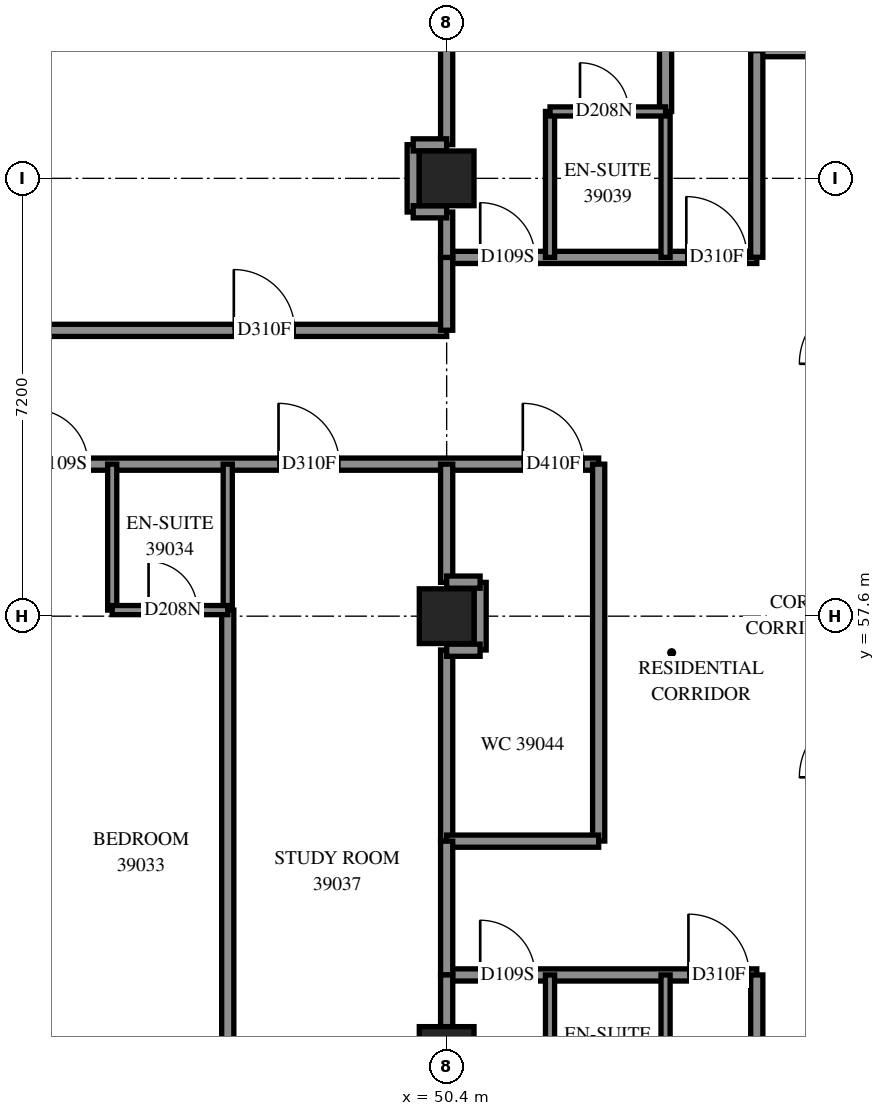
"""IFC4 building model, lengths in metres.
Left out: names, types, materials, properties, quantities, classifications, styles, units other than length and angle.
Written with IfcOpenShell. Run it as: python <this file> out.ifc"""

import sys

from ifc_helpers import new_model, si_unit, direction, frame, frame_2d, origin, origin_2d, place, context, subcontext, project, spatial, rectangle, extrude, element, fill, save


model = new_model("IFC4")
c1 = context("Model", 3, precision=1e-05, world=origin(), true_north=direction((0.0, 1.0)))
c2 = subcontext(c1, "Body", "Model", "MODEL_VIEW")
j1 = project(units=[si_unit("LENGTHUNIT", "METRE"), si_unit("PLANEANGLEUNIT", "RADIAN")], contexts=[c1])
p1 = place(None, origin())
s1 = spatial("IfcSite", under=j1, at=p1, CompositionType="ELEMENT")
p2 = place(p1, origin())
s2 = spatial("IfcBuilding", under=s1, at=p2, CompositionType="ELEMENT")
p3 = place(p2, frame((0.0, 0.0, 145.6)))
s3 = spatial("IfcBuildingStorey", under=s2, at=p3, CompositionType="ELEMENT", Elevation=145.6)
for number, where, z_axis, x_axis in (
    (1, (50.4, 50.4, 0.0), (0.0, 0.0, 1.0), (1.0, 0.0, 0.0)),
    (2, (50.4, 57.6, 0.0), (0.0, 0.0, 1.0), (1.0, 0.0, 0.0)),
    (3, (50.4, 64.8, 0.0), (0.0, 0.0, 1.0), (1.0, 0.0, 0.0)),
):
    element("IfcColumn", number, at=place(p3, frame(where, z_axis=z_axis, x_axis=x_axis)), inside=s3, PredefinedType="COLUMN", context=c2, shape_type="SweptSolid", body=[
        extrude(rectangle(XDim=0.9, YDim=0.9, at=origin_2d()), origin(), (0.0, 0.0, 1.0), 3.1),
    ])
p4 = place(p3, frame((55.5, 66.9, 0.0), z_axis=(0.0, 0.0, 1.0), x_axis=(1.0, 0.0, 0.0)))
e4 = element("IfcWall", 4, at=p4, inside=s3, PredefinedType="PARTITIONING", context=c2, shape_type="SweptSolid", body=[
    extrude(rectangle(XDim=18.6, YDim=0.2, at=frame_2d((9.3, 0.0))), origin(), (0.0, 0.0, 1.0), 3.1),
])
p5 = place(p4, frame((4.4, 0.0, 0.0)))
e5 = element("IfcOpeningElement", 5, at=p5, cuts=e4, PredefinedType="OPENING", context=c2, shape_type="SweptSolid", body=[
    extrude(rectangle(XDim=0.9, YDim=2.1, at=frame_2d((0.45, 1.05))), frame((0.0, 0.11, 0.0), z_axis=(0.0, -1.0, 0.0), x_axis=(1.0, 0.0, 0.0)), (0.0, 0.0, 1.0), 0.22),
])
p6 = place(p4, frame((6.1, 0.0, 0.0)))
e6 = element("IfcOpeningElement", 6, at=p6, cuts=e4, PredefinedType="OPENING", context=c2, shape_type="SweptSolid", body=[
    extrude(rectangle(XDim=0.9, YDim=2.1, at=frame_2d((0.45, 1.05))), frame((0.0, 0.11, 0.0), z_axis=(0.0, -1.0, 0.0), x_axis=(1.0, 0.0, 0.0)), (0.0, 0.0, 1.0), 0.22),
])
p7 = place(p4, frame((11.65, 0.0, 0.0)))
e7 = element("IfcOpeningElement", 7, at=p7, cuts=e4, PredefinedType="OPENING", context=c2, shape_type="SweptSolid", body=[
    extrude(rectangle(XDim=0.9, YDim=2.1, at=frame_2d((0.45, 1.05))), frame((0.0, 0.11, 0.0), z_axis=(0.0, -1.0, 0.0), x_axis=(1.0, 0.0, 0.0)), (0.0, 0.0, 1.0), 0.22),
])
p8 = place(p4, frame((13.3, 0.0, 0.0)))
e8 = element("IfcOpeningElement", 8, at=p8, cuts=e4, PredefinedType="OPENING", context=c2, shape_type="SweptSolid", body=[
    extrude(rectangle(XDim=0.9, YDim=2.1, at=frame_2d((0.45, 1.05))), frame((0.0, 0.11, 0.0), z_axis=(0.0, -1.0, 0.0), x_axis=(1.0, 0.0, 0.0)), (0.0, 0.0, 1.0), 0.22),
])
p9 = place(p3, frame((36.0, 60.1, 0.0), z_axis=(0.0, 0.0, 1.0), x_axis=(1.0, 0.0, 0.0)))
e9 = element("IfcWall", 9, at=p9, inside=s3, PredefinedType="PARTITIONING", context=c2, shape_type="SweptSolid", body=[
    extrude(rectangle(XDim=16.9, YDim=0.2, at=frame_2d((8.45, 0.0))), origin(), (0.0, 0.0, 1.0), 3.1),
])
p10 = place(p9, frame((4.125, 0.0, 0.0)))
e10 = element("IfcOpeningElement", 10, at=p10, cuts=e9, PredefinedType="OPENING", context=c2, shape_type="SweptSolid", body=[
    extrude(rectangle(XDim=1.0, YDim=2.1, at=frame_2d((0.5, 1.05))), frame((0.0, 0.11, 0.0), z_axis=(0.0, -1.0, 0.0), x_axis=(1.0, 0.0, 0.0)), (0.0, 0.0, 1.0), 0.22),
])
p11 = place(p9, frame((7.6, 0.0, 0.0)))
e11 = element("IfcOpeningElement", 11, at=p11, cuts=e9, PredefinedType="OPENING", context=c2, shape_type="SweptSolid", body=[
    extrude(rectangle(XDim=0.9, YDim=2.1, at=frame_2d((0.45, 1.05))), frame((0.0, 0.11, 0.0), z_axis=(0.0, -1.0, 0.0), x_axis=(1.0, 0.0, 0.0)), (0.0, 0.0, 1.0), 0.22),
])
p12 = place(p9, frame((11.635, 0.0, 0.0)))
e12 = element("IfcOpeningElement", 12, at=p12, cuts=e9, PredefinedType="OPENING", context=c2, shape_type="SweptSolid", body=[
    extrude(rectangle(XDim=1.0, YDim=2.1, at=frame_2d((0.5, 1.05))), frame((0.0, 0.11, 0.0), z_axis=(0.0, -1.0, 0.0), x_axis=(1.0, 0.0, 0.0)), (0.0, 0.0, 1.0), 0.22),
])
p13 = place(p9, frame((15.652, 0.0, 0.0)))
e13 = element("IfcOpeningElement", 13, at=p13, cuts=e9, PredefinedType="OPENING", context=c2, shape_type="SweptSolid", body=[
    extrude(rectangle(XDim=1.0, YDim=2.1, at=frame_2d((0.5, 1.05))), frame((0.0, 0.11, 0.0), z_axis=(0.0, -1.0, 0.0), x_axis=(1.0, 0.0, 0.0)), (0.0, 0.0, 1.0), 0.22),
])
p14 = place(p3, frame((40.702, 62.3, 0.0), z_axis=(0.0, 0.0, 1.0), x_axis=(1.0, 0.0, 0.0)))
e14 = element("IfcWall", 14, at=p14, inside=s3, PredefinedType="PARTITIONING", context=c2, shape_type="SweptSolid", body=[
    extrude(rectangle(XDim=9.698, YDim=0.2, at=frame_2d((4.849, 0.0))), origin(), (0.0, 0.0, 1.0), 3.1),
])
p15 = place(p14, frame((6.198, 0.0, 0.0)))
e15 = element("IfcOpeningElement", 15, at=p15, cuts=e14, PredefinedType="OPENING", context=c2, shape_type="SweptSolid", body=[
    extrude(rectangle(XDim=1.0, YDim=2.1, at=frame_2d((0.5, 1.05))), frame((0.0, 0.11, 0.0), z_axis=(0.0, -1.0, 0.0), x_axis=(1.0, 0.0, 0.0)), (0.0, 0.0, 1.0), 0.22),
])
p16 = place(p3, frame((46.8, 49.7, 0.0), z_axis=(0.0, 0.0, 1.0), x_axis=(0.0, 1.0, 0.0)))
e16 = element("IfcWall", 16, at=p16, inside=s3, PredefinedType="PARTITIONING", context=c2, shape_type="SweptSolid", body=[
    extrude(rectangle(XDim=8.0, YDim=0.2, at=frame_2d((4.0, 0.0))), origin(), (0.0, 0.0, 1.0), 3.1),
])
p17 = place(p3, frame((54.0, 65.9, 0.0), z_axis=(0.0, 0.0, 1.0), x_axis=(0.0, 1.0, 0.0)))
e17 = element("IfcWall", 17, at=p17, inside=s3, PredefinedType="PARTITIONING", context=c2, shape_type="SweptSolid", body=[
    extrude(rectangle(XDim=6.843, YDim=0.2, at=frame_2d((3.422, 0.0))), origin(), (0.0, 0.0, 1.0), 3.1),
])
p18 = place(p3, frame((52.9, 53.902, 0.0), z_axis=(0.0, 0.0, 1.0), x_axis=(0.0, 1.0, 0.0)))
e18 = element("IfcWall", 18, at=p18, inside=s3, PredefinedType="PARTITIONING", context=c2, shape_type="SweptSolid", body=[
    extrude(rectangle(XDim=6.198, YDim=0.2, at=frame_2d((3.099, 0.0))), origin(), (0.0, 0.0, 1.0), 3.1),
])
p19 = place(p3, frame((50.4, 65.354, 0.0), z_axis=(0.0, 0.0, 1.0), x_axis=(0.0, 1.0, 0.0)))
e19 = element("IfcWall", 19, at=p19, inside=s3, PredefinedType="PARTITIONING", context=c2, shape_type="SweptSolid", body=[
    extrude(rectangle(XDim=6.092, YDim=0.2, at=frame_2d((3.046, 0.0))), origin(), (0.0, 0.0, 1.0), 3.1),
])
p20 = place(p3, frame((50.4, 51.7, 0.0), z_axis=(0.0, 0.0, 1.0), x_axis=(1.0, 0.0, 0.0)))
e20 = element("IfcWall", 20, at=p20, inside=s3, PredefinedType="PARTITIONING", context=c2, shape_type="SweptSolid", body=[
    extrude(rectangle(XDim=5.1, YDim=0.2, at=frame_2d((2.55, 0.0))), origin(), (0.0, 0.0, 1.0), 3.1),
])
p21 = place(p20, frame((0.552, 0.0, 0.0)))
e21 = element("IfcOpeningElement", 21, at=p21, cuts=e20, PredefinedType="OPENING", context=c2, shape_type="SweptSolid", body=[
    extrude(rectangle(XDim=0.9, YDim=2.1, at=frame_2d((0.45, 1.05))), frame((0.0, 0.11, 0.0), z_axis=(0.0, -1.0, 0.0), x_axis=(1.0, 0.0, 0.0)), (0.0, 0.0, 1.0), 0.22),
])
p22 = place(p20, frame((3.976, 0.0, 0.0)))
e22 = element("IfcOpeningElement", 22, at=p22, cuts=e20, PredefinedType="OPENING", context=c2, shape_type="SweptSolid", body=[
    extrude(rectangle(XDim=1.0, YDim=2.1, at=frame_2d((0.5, 1.05))), frame((0.0, 0.11, 0.0), z_axis=(0.0, -1.0, 0.0), x_axis=(1.0, 0.0, 0.0)), (0.0, 0.0, 1.0), 0.22),
])
p23 = place(p3, frame((50.4, 63.5, 0.0), z_axis=(0.0, 0.0, 1.0), x_axis=(1.0, 0.0, 0.0)))
e23 = element("IfcWall", 23, at=p23, inside=s3, PredefinedType="PARTITIONING", context=c2, shape_type="SweptSolid", body=[
    extrude(rectangle(XDim=5.1, YDim=0.2, at=frame_2d((2.55, 0.0))), origin(), (0.0, 0.0, 1.0), 3.1),
])
p24 = place(p23, frame((0.552, 0.0, 0.0)))
e24 = element("IfcOpeningElement", 24, at=p24, cuts=e23, PredefinedType="OPENING", context=c2, shape_type="SweptSolid", body=[
    extrude(rectangle(XDim=0.9, YDim=2.1, at=frame_2d((0.45, 1.05))), frame((0.0, 0.11, 0.0), z_axis=(0.0, -1.0, 0.0), x_axis=(1.0, 0.0, 0.0)), (0.0, 0.0, 1.0), 0.22),
])
p25 = place(p23, frame((3.941, 0.0, 0.0)))
e25 = element("IfcOpeningElement", 25, at=p25, cuts=e23, PredefinedType="OPENING", context=c2, shape_type="SweptSolid", body=[
    extrude(rectangle(XDim=1.0, YDim=2.1, at=frame_2d((0.5, 1.05))), frame((0.0, 0.11, 0.0), z_axis=(0.0, -1.0, 0.0), x_axis=(1.0, 0.0, 0.0)), (0.0, 0.0, 1.0), 0.22),
])
p26 = place(p3, frame((55.5, 48.3, 0.0), z_axis=(0.0, 0.0, 1.0), x_axis=(0.0, 1.0, 0.0)))
e26 = element("IfcWall", 26, at=p26, inside=s3, PredefinedType="PARTITIONING", context=c2, shape_type="SweptSolid", body=[
    extrude(rectangle(XDim=3.4, YDim=0.2, at=frame_2d((1.7, 0.0))), origin(), (0.0, 0.0, 1.0), 3.1),
])
p27 = place(p3, frame((55.5, 63.502, 0.0), z_axis=(0.0, 0.0, 1.0), x_axis=(0.0, 1.0, 0.0)))
e27 = element("IfcWall", 27, at=p27, inside=s3, PredefinedType="PARTITIONING", context=c2, shape_type="SweptSolid", body=[
    extrude(rectangle(XDim=3.398, YDim=0.2, at=frame_2d((1.699, 0.0))), origin(), (0.0, 0.0, 1.0), 3.1),
])
p28 = place(p3, frame((50.4, 53.9, 0.0), z_axis=(0.0, 0.0, 1.0), x_axis=(0.0, 1.0, 0.0)))
e28 = element("IfcWall", 28, at=p28, inside=s3, PredefinedType="PARTITIONING", context=c2, shape_type="SweptSolid", body=[
    extrude(rectangle(XDim=3.144, YDim=0.2, at=frame_2d((1.572, 0.0))), origin(), (0.0, 0.0, 1.0), 3.1),
])
p29 = place(p3, frame((50.4, 53.9, 0.0), z_axis=(0.0, 0.0, 1.0), x_axis=(1.0, 0.0, 0.0)))
e29 = element("IfcWall", 29, at=p29, inside=s3, PredefinedType="PARTITIONING", context=c2, shape_type="SweptSolid", body=[
    extrude(rectangle(XDim=2.5, YDim=0.2, at=frame_2d((1.25, 0.0))), origin(), (0.0, 0.0, 1.0), 3.1),
])
for number, where, z_axis, x_axis in (
    (30, (52.1, 49.3, 0.0), (0.0, 0.0, 1.0), (0.0, 1.0, 0.0)),
    (31, (52.1, 63.5, 0.0), (0.0, 0.0, 1.0), (0.0, 1.0, 0.0)),
    (32, (54.0, 49.3, 0.0), (0.0, 0.0, 1.0), (0.0, 1.0, 0.0)),
    (33, (54.0, 63.5, 0.0), (0.0, 0.0, 1.0), (0.0, 1.0, 0.0)),
    (34, (44.9, 57.7, 0.0), (0.0, 0.0, 1.0), (0.0, 1.0, 0.0)),
    (35, (46.8, 57.7, 0.0), (0.0, 0.0, 1.0), (0.0, 1.0, 0.0)),
):
    element("IfcWall", number, at=place(p3, frame(where, z_axis=z_axis, x_axis=x_axis)), inside=s3, PredefinedType="PARTITIONING", context=c2, shape_type="SweptSolid", body=[
        extrude(rectangle(XDim=2.4, YDim=0.15, at=frame_2d((1.2, 0.0))), origin(), (0.0, 0.0, 1.0), 3.1),
    ])
p30 = place(p3, frame((50.4, 51.7, 0.0), z_axis=(0.0, 0.0, 1.0), x_axis=(0.0, 1.0, 0.0)))
e36 = element("IfcWall", 36, at=p30, inside=s3, PredefinedType="PARTITIONING", context=c2, shape_type="SweptSolid", body=[
    extrude(rectangle(XDim=2.2, YDim=0.2, at=frame_2d((1.1, 0.0))), origin(), (0.0, 0.0, 1.0), 3.1),
])
p31 = place(p3, frame((50.4, 58.156, 0.0), z_axis=(0.0, 0.0, 1.0), x_axis=(0.0, 1.0, 0.0)))
e37 = element("IfcWall", 37, at=p31, inside=s3, PredefinedType="PARTITIONING", context=c2, shape_type="SweptSolid", body=[
    extrude(rectangle(XDim=1.944, YDim=0.2, at=frame_2d((0.972, 0.0))), origin(), (0.0, 0.0, 1.0), 3.1),
])
p32 = place(p3, frame((44.9, 57.7, 0.0), z_axis=(0.0, 0.0, 1.0), x_axis=(1.0, 0.0, 0.0)))
e38 = element("IfcWall", 38, at=p32, inside=s3, PredefinedType="PARTITIONING", context=c2, shape_type="SweptSolid", body=[
    extrude(rectangle(XDim=1.9, YDim=0.15, at=frame_2d((0.95, 0.0))), origin(), (0.0, 0.0, 1.0), 3.1),
])
p33 = place(p32, frame((0.598, 0.0, 0.0)))
e39 = element("IfcOpeningElement", 39, at=p33, cuts=e38, PredefinedType="OPENING", context=c2, shape_type="SweptSolid", body=[
    extrude(rectangle(XDim=0.8, YDim=2.1, at=frame_2d((0.4, 1.05))), frame((0.0, 0.085, 0.0), z_axis=(0.0, -1.0, 0.0), x_axis=(1.0, 0.0, 0.0)), (0.0, 0.0, 1.0), 0.17),
])
p34 = place(p3, frame((52.1, 65.9, 0.0), z_axis=(0.0, 0.0, 1.0), x_axis=(1.0, 0.0, 0.0)))
e40 = element("IfcWall", 40, at=p34, inside=s3, PredefinedType="PARTITIONING", context=c2, shape_type="SweptSolid", body=[
    extrude(rectangle(XDim=1.9, YDim=0.15, at=frame_2d((0.95, 0.0))), origin(), (0.0, 0.0, 1.0), 3.1),
])
p35 = place(p34, frame((0.493, 0.0, 0.0)))
e41 = element("IfcOpeningElement", 41, at=p35, cuts=e40, PredefinedType="OPENING", context=c2, shape_type="SweptSolid", body=[
    extrude(rectangle(XDim=0.8, YDim=2.1, at=frame_2d((0.4, 1.05))), frame((0.0, 0.085, 0.0), z_axis=(0.0, -1.0, 0.0), x_axis=(1.0, 0.0, 0.0)), (0.0, 0.0, 1.0), 0.17),
])
p36 = place(p3, frame((50.4, 62.302, 0.0), z_axis=(0.0, 0.0, 1.0), x_axis=(0.0, 1.0, 0.0)))
e42 = element("IfcWall", 42, at=p36, inside=s3, PredefinedType="PARTITIONING", context=c2, shape_type="SweptSolid", body=[
    extrude(rectangle(XDim=1.198, YDim=0.2, at=frame_2d((0.599, 0.0))), origin(), (0.0, 0.0, 1.0), 3.1),
])
p37 = place(p3, frame((50.95, 57.044, 0.0), z_axis=(0.0, 0.0, 1.0), x_axis=(0.0, 1.0, 0.0)))
e43 = element("IfcWall", 43, at=p37, inside=s3, PredefinedType="PARTITIONING", context=c2, shape_type="SweptSolid", body=[
    extrude(rectangle(XDim=1.112, YDim=0.2, at=frame_2d((0.556, 0.0))), origin(), (0.0, 0.0, 1.0), 3.1),
])
p38 = place(p3, frame((49.85, 64.246, 0.0), z_axis=(0.0, 0.0, 1.0), x_axis=(0.0, 1.0, 0.0)))
e44 = element("IfcWall", 44, at=p38, inside=s3, PredefinedType="PARTITIONING", context=c2, shape_type="SweptSolid", body=[
    extrude(rectangle(XDim=1.108, YDim=0.2, at=frame_2d((0.554, 0.0))), origin(), (0.0, 0.0, 1.0), 3.1),
])
p39 = place(p3, frame((50.4, 50.85, 0.0), z_axis=(0.0, 0.0, 1.0), x_axis=(0.0, 1.0, 0.0)))
e45 = element("IfcWall", 45, at=p39, inside=s3, PredefinedType="PARTITIONING", context=c2, shape_type="SweptSolid", body=[
    extrude(rectangle(XDim=0.85, YDim=0.2, at=frame_2d((0.425, 0.0))), origin(), (0.0, 0.0, 1.0), 3.1),
])
p40 = place(p3, frame((50.4, 63.5, 0.0), z_axis=(0.0, 0.0, 1.0), x_axis=(0.0, 1.0, 0.0)))
e46 = element("IfcWall", 46, at=p40, inside=s3, PredefinedType="PARTITIONING", context=c2, shape_type="SweptSolid", body=[
    extrude(rectangle(XDim=0.746, YDim=0.2, at=frame_2d((0.373, 0.0))), origin(), (0.0, 0.0, 1.0), 3.1),
])
for number, where, z_axis, x_axis in (
    (47, (50.4, 58.16, 0.0), (0.0, 0.0, 1.0), (1.0, 0.0, 0.0)),
    (48, (50.4, 57.04, 0.0), (0.0, 0.0, 1.0), (1.0, 0.0, 0.0)),
    (49, (49.85, 65.35, 0.0), (0.0, 0.0, 1.0), (1.0, 0.0, 0.0)),
    (50, (49.85, 64.25, 0.0), (0.0, 0.0, 1.0), (1.0, 0.0, 0.0)),
):
    element("IfcWall", number, at=place(p3, frame(where, z_axis=z_axis, x_axis=x_axis)), inside=s3, PredefinedType="PARTITIONING", context=c2, shape_type="SweptSolid", body=[
        extrude(rectangle(XDim=0.55, YDim=0.2, at=frame_2d((0.275, 0.0))), origin(), (0.0, 0.0, 1.0), 3.1),
    ])
p41 = place(p11, origin())
e51 = element("IfcDoor", 51, at=p41, inside=s3, OperationType="SINGLE_SWING_LEFT", PredefinedType="DOOR", context=c2, shape_type="SweptSolid", body=[
    extrude(rectangle(XDim=0.9, YDim=2.1, at=frame_2d((0.45, 1.05))), frame((0.0, 0.025, 0.0), z_axis=(0.0, -1.0, 0.0), x_axis=(1.0, 0.0, 0.0)), (0.0, 0.0, 1.0), 0.05),
])
fill(e11, e51)
p42 = place(p33, origin())
e52 = element("IfcDoor", 52, at=p42, inside=s3, OperationType="SINGLE_SWING_RIGHT", PredefinedType="DOOR", context=c2, shape_type="SweptSolid", body=[
    extrude(rectangle(XDim=0.8, YDim=2.1, at=frame_2d((0.4, 1.05))), frame((0.0, 0.025, 0.0), z_axis=(0.0, -1.0, 0.0), x_axis=(1.0, 0.0, 0.0)), (0.0, 0.0, 1.0), 0.05),
])
fill(e39, e52)
p43 = place(p15, origin())
e53 = element("IfcDoor", 53, at=p43, inside=s3, OperationType="SINGLE_SWING_RIGHT", PredefinedType="DOOR", context=c2, shape_type="SweptSolid", body=[
    extrude(rectangle(XDim=1.0, YDim=2.1, at=frame_2d((0.5, 1.05))), frame((0.0, 0.025, 0.0), z_axis=(0.0, -1.0, 0.0), x_axis=(1.0, 0.0, 0.0)), (0.0, 0.0, 1.0), 0.05),
])
fill(e15, e53)
p44 = place(p12, origin())
e54 = element("IfcDoor", 54, at=p44, inside=s3, OperationType="SINGLE_SWING_RIGHT", PredefinedType="DOOR", context=c2, shape_type="SweptSolid", body=[
    extrude(rectangle(XDim=1.0, YDim=2.1, at=frame_2d((0.5, 1.05))), frame((0.0, 0.025, 0.0), z_axis=(0.0, -1.0, 0.0), x_axis=(1.0, 0.0, 0.0)), (0.0, 0.0, 1.0), 0.05),
])
fill(e12, e54)
p45 = place(p24, origin())
e55 = element("IfcDoor", 55, at=p45, inside=s3, OperationType="SINGLE_SWING_RIGHT", PredefinedType="DOOR", context=c2, shape_type="SweptSolid", body=[
    extrude(rectangle(XDim=0.9, YDim=2.1, at=frame_2d((0.45, 1.05))), frame((0.0, 0.025, 0.0), z_axis=(0.0, -1.0, 0.0), x_axis=(1.0, 0.0, 0.0)), (0.0, 0.0, 1.0), 0.05),
])
fill(e24, e55)
p46 = place(p35, origin())
e56 = element("IfcDoor", 56, at=p46, inside=s3, OperationType="SINGLE_SWING_RIGHT", PredefinedType="DOOR", context=c2, shape_type="SweptSolid", body=[
    extrude(rectangle(XDim=0.8, YDim=2.1, at=frame_2d((0.4, 1.05))), frame((0.0, 0.025, 0.0), z_axis=(0.0, -1.0, 0.0), x_axis=(1.0, 0.0, 0.0)), (0.0, 0.0, 1.0), 0.05),
])
fill(e41, e56)
p47 = place(p25, origin())
e57 = element("IfcDoor", 57, at=p47, inside=s3, OperationType="SINGLE_SWING_LEFT", PredefinedType="DOOR", context=c2, shape_type="SweptSolid", body=[
    extrude(rectangle(XDim=1.0, YDim=2.1, at=frame_2d((0.5, 1.05))), frame((0.0, 0.025, 0.0), z_axis=(0.0, -1.0, 0.0), x_axis=(1.0, 0.0, 0.0)), (0.0, 0.0, 1.0), 0.05),
])
fill(e25, e57)
p48 = place(p13, origin())
e58 = element("IfcDoor", 58, at=p48, inside=s3, OperationType="SINGLE_SWING_LEFT", PredefinedType="DOOR", context=c2, shape_type="SweptSolid", body=[
    extrude(rectangle(XDim=1.0, YDim=2.1, at=frame_2d((0.5, 1.05))), frame((0.0, 0.025, 0.0), z_axis=(0.0, -1.0, 0.0), x_axis=(1.0, 0.0, 0.0)), (0.0, 0.0, 1.0), 0.05),
])
fill(e13, e58)
p49 = place(p21, origin())
e59 = element("IfcDoor", 59, at=p49, inside=s3, OperationType="SINGLE_SWING_LEFT", PredefinedType="DOOR", context=c2, shape_type="SweptSolid", body=[
    extrude(rectangle(XDim=0.9, YDim=2.1, at=frame_2d((0.45, 1.05))), frame((0.0, 0.025, 0.0), z_axis=(0.0, -1.0, 0.0), x_axis=(1.0, 0.0, 0.0)), (0.0, 0.0, 1.0), 0.05),
])
fill(e21, e59)
p50 = place(p22, origin())
e60 = element("IfcDoor", 60, at=p50, inside=s3, OperationType="SINGLE_SWING_RIGHT", PredefinedType="DOOR", context=c2, shape_type="SweptSolid", body=[
    extrude(rectangle(XDim=1.0, YDim=2.1, at=frame_2d((0.5, 1.05))), frame((0.0, 0.025, 0.0), z_axis=(0.0, -1.0, 0.0), x_axis=(1.0, 0.0, 0.0)), (0.0, 0.0, 1.0), 0.05),
])
fill(e22, e60)
save(model, sys.argv[1])
